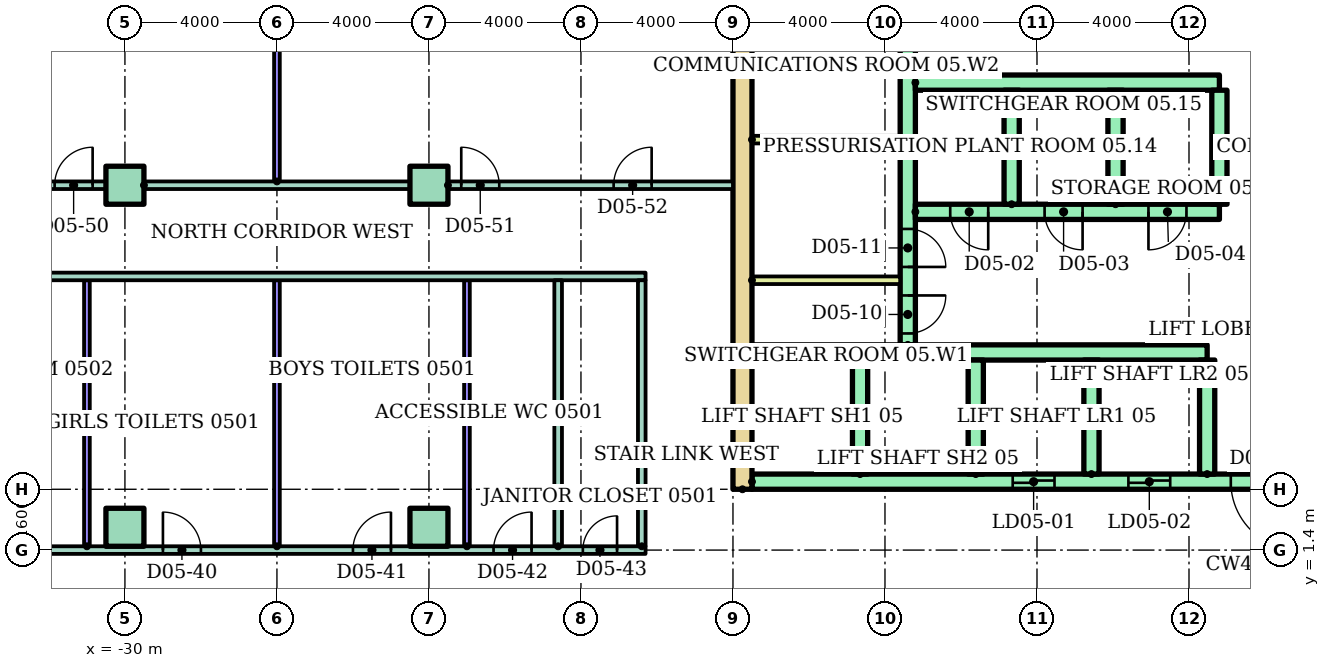
"""IFC4 building model, lengths in metres.
Left out: names, types, materials, properties, quantities, classifications, styles, units other than length and angle.
Written with IfcOpenShell. Run it as: python <this file> out.ifc"""

import sys

from ifc_helpers import new_model, si_unit, direction, frame, frame_2d, origin, origin_2d, place, context, subcontext, project, spatial, rectangle, extrude, element, fill, save


model = new_model("IFC4")
c1 = context("Model", 3, precision=1e-05, world=origin(), true_north=direction((0.0, 1.0)))
c2 = subcontext(c1, "Body", "Model", "MODEL_VIEW")
j1 = project(units=[si_unit("LENGTHUNIT", "METRE"), si_unit("PLANEANGLEUNIT", "RADIAN")], contexts=[c1])
p1 = place(None, origin())
s1 = spatial("IfcSite", under=j1, at=p1, CompositionType="ELEMENT")
p2 = place(p1, origin())
s2 = spatial("IfcBuilding", under=s1, at=p2, CompositionType="ELEMENT")
p3 = place(p2, frame((0.0, 0.0, 22.0)))
s3 = spatial("IfcBuildingStorey", under=s2, at=p3, CompositionType="ELEMENT", Elevation=22.0)
for number, where in (
    (1, (-30.0, 2.0, 0.0)),
    (2, (-22.0, 2.0, 0.0)),
    (3, (-30.0, 11.0, 0.0)),
    (4, (-22.0, 11.0, 0.0)),
):
    element("IfcColumn", number, at=place(p3, frame(where)), inside=s3, PredefinedType="COLUMN", context=c2, shape_type="SweptSolid", body=[
        extrude(rectangle(XDim=1.0, YDim=1.0, at=origin_2d()), origin(), (0.0, 0.0, 1.0), 4.0),
    ])
p4 = place(p3, frame((-13.75, 3.0, 0.0), z_axis=(0.0, 0.0, 1.0), x_axis=(0.0, 1.0, 0.0)))
e5 = element("IfcWall", 5, at=p4, inside=s3, PredefinedType="SHEAR", context=c2, shape_type="SweptSolid", body=[
    extrude(rectangle(XDim=17.0, YDim=0.5, at=frame_2d((8.5, 0.0))), origin(), (0.0, 0.0, 1.0), 3.2),
])
p5 = place(p3, frame((-9.4, 6.8, 0.0), z_axis=(0.0, 0.0, 1.0), x_axis=(0.0, 1.0, 0.0)))
e6 = element("IfcWall", 6, at=p5, inside=s3, PredefinedType="SHEAR", context=c2, shape_type="SweptSolid", body=[
    extrude(rectangle(XDim=12.7, YDim=0.4, at=frame_2d((6.35, 0.0))), origin(), (0.0, 0.0, 1.0), 3.2),
])
p6 = place(p5, frame((0.3, 0.0, 0.0)))
e7 = element("IfcOpeningElement", 7, at=p6, cuts=e6, PredefinedType="OPENING", context=c2, shape_type="SweptSolid", body=[
    extrude(rectangle(XDim=1.0, YDim=2.1, at=frame_2d((0.5, 1.05))), frame((0.0, 0.21, 0.0), z_axis=(0.0, -1.0, 0.0), x_axis=(1.0, 0.0, 0.0)), (0.0, 0.0, 1.0), 0.42),
])
p7 = place(p5, frame((2.05, 0.0, 0.0)))
e8 = element("IfcOpeningElement", 8, at=p7, cuts=e6, PredefinedType="OPENING", context=c2, shape_type="SweptSolid", body=[
    extrude(rectangle(XDim=1.0, YDim=2.1, at=frame_2d((0.5, 1.05))), frame((0.0, 0.21, 0.0), z_axis=(0.0, -1.0, 0.0), x_axis=(1.0, 0.0, 0.0)), (0.0, 0.0, 1.0), 0.42),
])
p8 = place(p5, frame((7.925, 0.0, 0.0)))
e9 = element("IfcOpeningElement", 9, at=p8, cuts=e6, PredefinedType="OPENING", context=c2, shape_type="SweptSolid", body=[
    extrude(rectangle(XDim=1.0, YDim=2.1, at=frame_2d((0.5, 1.05))), frame((0.0, 0.21, 0.0), z_axis=(0.0, -1.0, 0.0), x_axis=(1.0, 0.0, 0.0)), (0.0, 0.0, 1.0), 0.42),
])
p9 = place(p3, frame((-13.5, 3.2, 0.0)))
e10 = element("IfcWall", 10, at=p9, inside=s3, PredefinedType="SHEAR", context=c2, shape_type="SweptSolid", body=[
    extrude(rectangle(XDim=27.0, YDim=0.4, at=frame_2d((13.5, 0.0))), origin(), (0.0, 0.0, 1.0), 3.2),
])
p10 = place(p9, frame((6.861, 0.0, 0.0)))
e11 = element("IfcOpeningElement", 11, at=p10, cuts=e10, PredefinedType="OPENING", context=c2, shape_type="SweptSolid", body=[
    extrude(rectangle(XDim=1.1, YDim=2.1, at=frame_2d((0.55, 1.05))), frame((0.0, 0.21, 0.0), z_axis=(0.0, -1.0, 0.0), x_axis=(1.0, 0.0, 0.0)), (0.0, 0.0, 1.0), 0.42),
])
p11 = place(p9, frame((9.906, 0.0, 0.0)))
e12 = element("IfcOpeningElement", 12, at=p11, cuts=e10, PredefinedType="OPENING", context=c2, shape_type="SweptSolid", body=[
    extrude(rectangle(XDim=1.1, YDim=2.1, at=frame_2d((0.55, 1.05))), frame((0.0, 0.21, 0.0), z_axis=(0.0, -1.0, 0.0), x_axis=(1.0, 0.0, 0.0)), (0.0, 0.0, 1.0), 0.42),
])
p12 = place(p9, frame((15.994, 0.0, 0.0)))
e13 = element("IfcOpeningElement", 13, at=p12, cuts=e10, PredefinedType="OPENING", context=c2, shape_type="SweptSolid", body=[
    extrude(rectangle(XDim=1.1, YDim=2.1, at=frame_2d((0.55, 1.05))), frame((0.0, 0.21, 0.0), z_axis=(0.0, -1.0, 0.0), x_axis=(1.0, 0.0, 0.0)), (0.0, 0.0, 1.0), 0.42),
])
p13 = place(p9, frame((19.039, 0.0, 0.0)))
e14 = element("IfcOpeningElement", 14, at=p13, cuts=e10, PredefinedType="OPENING", context=c2, shape_type="SweptSolid", body=[
    extrude(rectangle(XDim=1.1, YDim=2.1, at=frame_2d((0.55, 1.05))), frame((0.0, 0.21, 0.0), z_axis=(0.0, -1.0, 0.0), x_axis=(1.0, 0.0, 0.0)), (0.0, 0.0, 1.0), 0.42),
])
p14 = place(p9, frame((12.6, 0.0, 0.0)))
e15 = element("IfcOpeningElement", 15, at=p14, cuts=e10, PredefinedType="OPENING", context=c2, shape_type="SweptSolid", body=[
    extrude(rectangle(XDim=1.8, YDim=2.1, at=frame_2d((0.9, 1.05))), frame((0.0, 0.21, 0.0), z_axis=(0.0, -1.0, 0.0), x_axis=(1.0, 0.0, 0.0)), (0.0, 0.0, 1.0), 0.42),
])
p15 = place(p3, frame((-13.5, 6.6, 0.0)))
e16 = element("IfcWall", 16, at=p15, inside=s3, PredefinedType="SHEAR", context=c2, shape_type="SweptSolid", body=[
    extrude(rectangle(XDim=11.978, YDim=0.4, at=frame_2d((5.989, 0.0))), origin(), (0.0, 0.0, 1.0), 3.2),
])
for number, where, z_axis, x_axis in (
    (17, (-10.656, 3.4, 0.0), (0.0, 0.0, 1.0), (0.0, 1.0, 0.0)),
    (18, (-7.611, 3.4, 0.0), (0.0, 0.0, 1.0), (0.0, 1.0, 0.0)),
    (19, (-4.567, 3.4, 0.0), (0.0, 0.0, 1.0), (0.0, 1.0, 0.0)),
    (20, (-1.522, 3.4, 0.0), (0.0, 0.0, 1.0), (0.0, 1.0, 0.0)),
):
    element("IfcWall", number, at=place(p3, frame(where, z_axis=z_axis, x_axis=x_axis)), inside=s3, PredefinedType="SHEAR", context=c2, shape_type="SweptSolid", body=[
        extrude(rectangle(XDim=3.0, YDim=0.4, at=frame_2d((1.5, 0.0))), origin(), (0.0, 0.0, 1.0), 3.2),
    ])
p16 = place(p3, frame((-9.2, 10.3, 0.0)))
e21 = element("IfcWall", 21, at=p16, inside=s3, PredefinedType="SHEAR", context=c2, shape_type="SweptSolid", body=[
    extrude(rectangle(XDim=8.0, YDim=0.4, at=frame_2d((4.0, 0.0))), origin(), (0.0, 0.0, 1.0), 3.2),
])
p17 = place(p16, frame((0.917, 0.0, 0.0)))
e22 = element("IfcOpeningElement", 22, at=p17, cuts=e21, PredefinedType="OPENING", context=c2, shape_type="SweptSolid", body=[
    extrude(rectangle(XDim=1.0, YDim=2.1, at=frame_2d((0.5, 1.05))), frame((0.0, 0.21, 0.0), z_axis=(0.0, -1.0, 0.0), x_axis=(1.0, 0.0, 0.0)), (0.0, 0.0, 1.0), 0.42),
])
p18 = place(p16, frame((3.4, 0.0, 0.0)))
e23 = element("IfcOpeningElement", 23, at=p18, cuts=e21, PredefinedType="OPENING", context=c2, shape_type="SweptSolid", body=[
    extrude(rectangle(XDim=1.0, YDim=2.1, at=frame_2d((0.5, 1.05))), frame((0.0, 0.21, 0.0), z_axis=(0.0, -1.0, 0.0), x_axis=(1.0, 0.0, 0.0)), (0.0, 0.0, 1.0), 0.42),
])
p19 = place(p16, frame((6.133, 0.0, 0.0)))
e24 = element("IfcOpeningElement", 24, at=p19, cuts=e21, PredefinedType="OPENING", context=c2, shape_type="SweptSolid", body=[
    extrude(rectangle(XDim=1.0, YDim=2.1, at=frame_2d((0.5, 1.05))), frame((0.0, 0.21, 0.0), z_axis=(0.0, -1.0, 0.0), x_axis=(1.0, 0.0, 0.0)), (0.0, 0.0, 1.0), 0.42),
])
p20 = place(p3, frame((-9.2, 13.7, 0.0)))
e25 = element("IfcWall", 25, at=p20, inside=s3, PredefinedType="SHEAR", context=c2, shape_type="SweptSolid", body=[
    extrude(rectangle(XDim=8.0, YDim=0.4, at=frame_2d((4.0, 0.0))), origin(), (0.0, 0.0, 1.0), 3.2),
])
for number, where, z_axis, x_axis in (
    (26, (-6.667, 10.5, 0.0), (0.0, 0.0, 1.0), (0.0, 1.0, 0.0)),
    (27, (-3.933, 10.5, 0.0), (0.0, 0.0, 1.0), (0.0, 1.0, 0.0)),
    (28, (-1.2, 10.5, 0.0), (0.0, 0.0, 1.0), (0.0, 1.0, 0.0)),
):
    element("IfcWall", number, at=place(p3, frame(where, z_axis=z_axis, x_axis=x_axis)), inside=s3, PredefinedType="SHEAR", context=c2, shape_type="SweptSolid", body=[
        extrude(rectangle(XDim=3.0, YDim=0.4, at=frame_2d((1.5, 0.0))), origin(), (0.0, 0.0, 1.0), 3.2),
    ])
for number, where in (
    (29, (-13.5, 8.5, 0.0)),
    (30, (-13.5, 12.2, 0.0)),
):
    element("IfcWall", number, at=place(p3, frame(where)), inside=s3, PredefinedType="PARTITIONING", context=c2, shape_type="SweptSolid", body=[
        extrude(rectangle(XDim=3.9, YDim=0.2, at=frame_2d((1.95, 0.0))), origin(), (0.0, 0.0, 1.0), 3.2),
    ])
p21 = place(p3, frame((-36.9, 1.4, 0.0)))
e31 = element("IfcWall", 31, at=p21, inside=s3, PredefinedType="PARTITIONING", context=c2, shape_type="SweptSolid", body=[
    extrude(rectangle(XDim=20.6, YDim=0.2, at=frame_2d((10.3, 0.0))), origin(), (0.0, 0.0, 1.0), 3.2),
])
p22 = place(p21, frame((7.9, 0.0, 0.0)))
e32 = element("IfcOpeningElement", 32, at=p22, cuts=e31, PredefinedType="OPENING", context=c2, shape_type="SweptSolid", body=[
    extrude(rectangle(XDim=1.0, YDim=2.1, at=frame_2d((0.5, 1.05))), frame((0.0, 0.11, 0.0), z_axis=(0.0, -1.0, 0.0), x_axis=(1.0, 0.0, 0.0)), (0.0, 0.0, 1.0), 0.22),
])
p23 = place(p21, frame((12.9, 0.0, 0.0)))
e33 = element("IfcOpeningElement", 33, at=p23, cuts=e31, PredefinedType="OPENING", context=c2, shape_type="SweptSolid", body=[
    extrude(rectangle(XDim=1.0, YDim=2.1, at=frame_2d((0.5, 1.05))), frame((0.0, 0.11, 0.0), z_axis=(0.0, -1.0, 0.0), x_axis=(1.0, 0.0, 0.0)), (0.0, 0.0, 1.0), 0.22),
])
p24 = place(p21, frame((16.6, 0.0, 0.0)))
e34 = element("IfcOpeningElement", 34, at=p24, cuts=e31, PredefinedType="OPENING", context=c2, shape_type="SweptSolid", body=[
    extrude(rectangle(XDim=1.0, YDim=2.1, at=frame_2d((0.5, 1.05))), frame((0.0, 0.11, 0.0), z_axis=(0.0, -1.0, 0.0), x_axis=(1.0, 0.0, 0.0)), (0.0, 0.0, 1.0), 0.22),
])
p25 = place(p21, frame((18.95, 0.0, 0.0)))
e35 = element("IfcOpeningElement", 35, at=p25, cuts=e31, PredefinedType="OPENING", context=c2, shape_type="SweptSolid", body=[
    extrude(rectangle(XDim=0.9, YDim=2.1, at=frame_2d((0.45, 1.05))), frame((0.0, 0.11, 0.0), z_axis=(0.0, -1.0, 0.0), x_axis=(1.0, 0.0, 0.0)), (0.0, 0.0, 1.0), 0.22),
])
p26 = place(p3, frame((-37.6, 8.6, 0.0)))
e36 = element("IfcWall", 36, at=p26, inside=s3, PredefinedType="PARTITIONING", context=c2, shape_type="SweptSolid", body=[
    extrude(rectangle(XDim=21.3, YDim=0.2, at=frame_2d((10.65, 0.0))), origin(), (0.0, 0.0, 1.0), 3.2),
])
p27 = place(p3, frame((-36.9, 11.0, 0.0)))
e37 = element("IfcWall", 37, at=p27, inside=s3, PredefinedType="PARTITIONING", context=c2, shape_type="SweptSolid", body=[
    extrude(rectangle(XDim=6.4, YDim=0.2, at=frame_2d((3.2, 0.0))), origin(), (0.0, 0.0, 1.0), 3.2),
])
p28 = place(p27, frame((1.352, 0.0, 0.0)))
e38 = element("IfcOpeningElement", 38, at=p28, cuts=e37, PredefinedType="OPENING", context=c2, shape_type="SweptSolid", body=[
    extrude(rectangle(XDim=1.0, YDim=2.1, at=frame_2d((0.5, 1.05))), frame((0.0, 0.11, 0.0), z_axis=(0.0, -1.0, 0.0), x_axis=(1.0, 0.0, 0.0)), (0.0, 0.0, 1.0), 0.22),
])
p29 = place(p27, frame((5.05, 0.0, 0.0)))
e39 = element("IfcOpeningElement", 39, at=p29, cuts=e37, PredefinedType="OPENING", context=c2, shape_type="SweptSolid", body=[
    extrude(rectangle(XDim=1.0, YDim=2.1, at=frame_2d((0.5, 1.05))), frame((0.0, 0.11, 0.0), z_axis=(0.0, -1.0, 0.0), x_axis=(1.0, 0.0, 0.0)), (0.0, 0.0, 1.0), 0.22),
])
p30 = place(p3, frame((-29.5, 11.0, 0.0)))
e40 = element("IfcWall", 40, at=p30, inside=s3, PredefinedType="PARTITIONING", context=c2, shape_type="SweptSolid", body=[
    extrude(rectangle(XDim=7.0, YDim=0.2, at=frame_2d((3.5, 0.0))), origin(), (0.0, 0.0, 1.0), 3.2),
])
p31 = place(p3, frame((-21.5, 11.0, 0.0)))
e41 = element("IfcWall", 41, at=p31, inside=s3, PredefinedType="PARTITIONING", context=c2, shape_type="SweptSolid", body=[
    extrude(rectangle(XDim=7.5, YDim=0.2, at=frame_2d((3.75, 0.0))), origin(), (0.0, 0.0, 1.0), 3.2),
])
p32 = place(p31, frame((0.35, 0.0, 0.0)))
e42 = element("IfcOpeningElement", 42, at=p32, cuts=e41, PredefinedType="OPENING", context=c2, shape_type="SweptSolid", body=[
    extrude(rectangle(XDim=1.0, YDim=2.1, at=frame_2d((0.5, 1.05))), frame((0.0, 0.11, 0.0), z_axis=(0.0, -1.0, 0.0), x_axis=(1.0, 0.0, 0.0)), (0.0, 0.0, 1.0), 0.22),
])
p33 = place(p31, frame((4.36, 0.0, 0.0)))
e43 = element("IfcOpeningElement", 43, at=p33, cuts=e41, PredefinedType="OPENING", context=c2, shape_type="SweptSolid", body=[
    extrude(rectangle(XDim=1.0, YDim=2.1, at=frame_2d((0.5, 1.05))), frame((0.0, 0.11, 0.0), z_axis=(0.0, -1.0, 0.0), x_axis=(1.0, 0.0, 0.0)), (0.0, 0.0, 1.0), 0.22),
])
for number, where, z_axis, x_axis in (
    (44, (-31.0, 1.5, 0.0), (0.0, 0.0, 1.0), (0.0, 1.0, 0.0)),
    (45, (-26.0, 1.5, 0.0), (0.0, 0.0, 1.0), (0.0, 1.0, 0.0)),
):
    element("IfcWall", number, at=place(p3, frame(where, z_axis=z_axis, x_axis=x_axis)), inside=s3, PredefinedType="PARTITIONING", context=c2, shape_type="SweptSolid", body=[
        extrude(rectangle(XDim=7.0, YDim=0.15, at=frame_2d((3.5, 0.0))), origin(), (0.0, 0.0, 1.0), 3.2),
    ])
p34 = place(p3, frame((-26.0, 11.1, 0.0), z_axis=(0.0, 0.0, 1.0), x_axis=(0.0, 1.0, 0.0)))
e46 = element("IfcWall", 46, at=p34, inside=s3, PredefinedType="PARTITIONING", context=c2, shape_type="SweptSolid", body=[
    extrude(rectangle(XDim=8.5, YDim=0.15, at=frame_2d((4.25, 0.0))), origin(), (0.0, 0.0, 1.0), 3.2),
])
p35 = place(p3, frame((-21.0, 1.5, 0.0), z_axis=(0.0, 0.0, 1.0), x_axis=(0.0, 1.0, 0.0)))
e47 = element("IfcWall", 47, at=p35, inside=s3, PredefinedType="PARTITIONING", context=c2, shape_type="SweptSolid", body=[
    extrude(rectangle(XDim=7.0, YDim=0.15, at=frame_2d((3.5, 0.0))), origin(), (0.0, 0.0, 1.0), 3.2),
])
for number, where, z_axis, x_axis in (
    (48, (-18.6, 1.5, 0.0), (0.0, 0.0, 1.0), (0.0, 1.0, 0.0)),
    (49, (-16.4, 1.5, 0.0), (0.0, 0.0, 1.0), (0.0, 1.0, 0.0)),
):
    element("IfcWall", number, at=place(p3, frame(where, z_axis=z_axis, x_axis=x_axis)), inside=s3, PredefinedType="PARTITIONING", context=c2, shape_type="SweptSolid", body=[
        extrude(rectangle(XDim=7.0, YDim=0.2, at=frame_2d((3.5, 0.0))), origin(), (0.0, 0.0, 1.0), 3.2),
    ])
p36 = place(p10, origin())
e50 = element("IfcDoor", 50, at=p36, inside=s3, OperationType="SLIDING_TO_LEFT", PredefinedType="DOOR", context=c2, shape_type="SweptSolid", body=[
    extrude(rectangle(XDim=1.1, YDim=2.1, at=frame_2d((0.55, 1.05))), frame((0.0, 0.025, 0.0), z_axis=(0.0, -1.0, 0.0), x_axis=(1.0, 0.0, 0.0)), (0.0, 0.0, 1.0), 0.05),
])
fill(e11, e50)
p37 = place(p11, origin())
e51 = element("IfcDoor", 51, at=p37, inside=s3, OperationType="SLIDING_TO_LEFT", PredefinedType="DOOR", context=c2, shape_type="SweptSolid", body=[
    extrude(rectangle(XDim=1.1, YDim=2.1, at=frame_2d((0.55, 1.05))), frame((0.0, 0.025, 0.0), z_axis=(0.0, -1.0, 0.0), x_axis=(1.0, 0.0, 0.0)), (0.0, 0.0, 1.0), 0.05),
])
fill(e12, e51)
p38 = place(p14, frame((1.8, 0.0, 0.0), z_axis=(0.0, 0.0, 1.0), x_axis=(-1.0, 0.0, 0.0)))
e52 = element("IfcDoor", 52, at=p38, inside=s3, OperationType="DOUBLE_DOOR_SINGLE_SWING", PredefinedType="DOOR", context=c2, shape_type="SweptSolid", body=[
    extrude(rectangle(XDim=1.8, YDim=2.1, at=frame_2d((0.9, 1.05))), frame((0.0, 0.025, 0.0), z_axis=(0.0, -1.0, 0.0), x_axis=(1.0, 0.0, 0.0)), (0.0, 0.0, 1.0), 0.05),
])
fill(e15, e52)
p39 = place(p17, frame((1.0, 0.0, 0.0), z_axis=(0.0, 0.0, 1.0), x_axis=(-1.0, 0.0, 0.0)))
e53 = element("IfcDoor", 53, at=p39, inside=s3, OperationType="SINGLE_SWING_RIGHT", PredefinedType="DOOR", context=c2, shape_type="SweptSolid", body=[
    extrude(rectangle(XDim=1.0, YDim=2.1, at=frame_2d((0.5, 1.05))), frame((0.0, 0.025, 0.0), z_axis=(0.0, -1.0, 0.0), x_axis=(1.0, 0.0, 0.0)), (0.0, 0.0, 1.0), 0.05),
])
fill(e22, e53)
p40 = place(p18, frame((1.0, 0.0, 0.0), z_axis=(0.0, 0.0, 1.0), x_axis=(-1.0, 0.0, 0.0)))
e54 = element("IfcDoor", 54, at=p40, inside=s3, OperationType="SINGLE_SWING_RIGHT", PredefinedType="DOOR", context=c2, shape_type="SweptSolid", body=[
    extrude(rectangle(XDim=1.0, YDim=2.1, at=frame_2d((0.5, 1.05))), frame((0.0, 0.025, 0.0), z_axis=(0.0, -1.0, 0.0), x_axis=(1.0, 0.0, 0.0)), (0.0, 0.0, 1.0), 0.05),
])
fill(e23, e54)
p41 = place(p19, frame((1.0, 0.0, 0.0), z_axis=(0.0, 0.0, 1.0), x_axis=(-1.0, 0.0, 0.0)))
e55 = element("IfcDoor", 55, at=p41, inside=s3, OperationType="SINGLE_SWING_LEFT", PredefinedType="DOOR", context=c2, shape_type="SweptSolid", body=[
    extrude(rectangle(XDim=1.0, YDim=2.1, at=frame_2d((0.5, 1.05))), frame((0.0, 0.025, 0.0), z_axis=(0.0, -1.0, 0.0), x_axis=(1.0, 0.0, 0.0)), (0.0, 0.0, 1.0), 0.05),
])
fill(e24, e55)
p42 = place(p6, frame((1.0, 0.0, 0.0), z_axis=(0.0, 0.0, 1.0), x_axis=(-1.0, 0.0, 0.0)))
e56 = element("IfcDoor", 56, at=p42, inside=s3, OperationType="SINGLE_SWING_RIGHT", PredefinedType="DOOR", context=c2, shape_type="SweptSolid", body=[
    extrude(rectangle(XDim=1.0, YDim=2.1, at=frame_2d((0.5, 1.05))), frame((0.0, 0.025, 0.0), z_axis=(0.0, -1.0, 0.0), x_axis=(1.0, 0.0, 0.0)), (0.0, 0.0, 1.0), 0.05),
])
fill(e7, e56)
p43 = place(p7, frame((1.0, 0.0, 0.0), z_axis=(0.0, 0.0, 1.0), x_axis=(-1.0, 0.0, 0.0)))
e57 = element("IfcDoor", 57, at=p43, inside=s3, OperationType="SINGLE_SWING_LEFT", PredefinedType="DOOR", context=c2, shape_type="SweptSolid", body=[
    extrude(rectangle(XDim=1.0, YDim=2.1, at=frame_2d((0.5, 1.05))), frame((0.0, 0.025, 0.0), z_axis=(0.0, -1.0, 0.0), x_axis=(1.0, 0.0, 0.0)), (0.0, 0.0, 1.0), 0.05),
])
fill(e8, e57)
p44 = place(p22, origin())
e58 = element("IfcDoor", 58, at=p44, inside=s3, OperationType="SINGLE_SWING_LEFT", PredefinedType="DOOR", context=c2, shape_type="SweptSolid", body=[
    extrude(rectangle(XDim=1.0, YDim=2.1, at=frame_2d((0.5, 1.05))), frame((0.0, 0.025, 0.0), z_axis=(0.0, -1.0, 0.0), x_axis=(1.0, 0.0, 0.0)), (0.0, 0.0, 1.0), 0.05),
])
fill(e32, e58)
p45 = place(p23, origin())
e59 = element("IfcDoor", 59, at=p45, inside=s3, OperationType="SINGLE_SWING_RIGHT", PredefinedType="DOOR", context=c2, shape_type="SweptSolid", body=[
    extrude(rectangle(XDim=1.0, YDim=2.1, at=frame_2d((0.5, 1.05))), frame((0.0, 0.025, 0.0), z_axis=(0.0, -1.0, 0.0), x_axis=(1.0, 0.0, 0.0)), (0.0, 0.0, 1.0), 0.05),
])
fill(e33, e59)
p46 = place(p24, origin())
e60 = element("IfcDoor", 60, at=p46, inside=s3, OperationType="SINGLE_SWING_RIGHT", PredefinedType="DOOR", context=c2, shape_type="SweptSolid", body=[
    extrude(rectangle(XDim=1.0, YDim=2.1, at=frame_2d((0.5, 1.05))), frame((0.0, 0.025, 0.0), z_axis=(0.0, -1.0, 0.0), x_axis=(1.0, 0.0, 0.0)), (0.0, 0.0, 1.0), 0.05),
])
fill(e34, e60)
p47 = place(p25, origin())
e61 = element("IfcDoor", 61, at=p47, inside=s3, OperationType="SINGLE_SWING_RIGHT", PredefinedType="DOOR", context=c2, shape_type="SweptSolid", body=[
    extrude(rectangle(XDim=0.9, YDim=2.1, at=frame_2d((0.45, 1.05))), frame((0.0, 0.025, 0.0), z_axis=(0.0, -1.0, 0.0), x_axis=(1.0, 0.0, 0.0)), (0.0, 0.0, 1.0), 0.05),
])
fill(e35, e61)
p48 = place(p29, origin())
e62 = element("IfcDoor", 62, at=p48, inside=s3, OperationType="SINGLE_SWING_RIGHT", PredefinedType="DOOR", context=c2, shape_type="SweptSolid", body=[
    extrude(rectangle(XDim=1.0, YDim=2.1, at=frame_2d((0.5, 1.05))), frame((0.0, 0.025, 0.0), z_axis=(0.0, -1.0, 0.0), x_axis=(1.0, 0.0, 0.0)), (0.0, 0.0, 1.0), 0.05),
])
fill(e39, e62)
p49 = place(p32, origin())
e63 = element("IfcDoor", 63, at=p49, inside=s3, OperationType="SINGLE_SWING_LEFT", PredefinedType="DOOR", context=c2, shape_type="SweptSolid", body=[
    extrude(rectangle(XDim=1.0, YDim=2.1, at=frame_2d((0.5, 1.05))), frame((0.0, 0.025, 0.0), z_axis=(0.0, -1.0, 0.0), x_axis=(1.0, 0.0, 0.0)), (0.0, 0.0, 1.0), 0.05),
])
fill(e42, e63)
p50 = place(p33, origin())
e64 = element("IfcDoor", 64, at=p50, inside=s3, OperationType="SINGLE_SWING_RIGHT", PredefinedType="DOOR", context=c2, shape_type="SweptSolid", body=[
    extrude(rectangle(XDim=1.0, YDim=2.1, at=frame_2d((0.5, 1.05))), frame((0.0, 0.025, 0.0), z_axis=(0.0, -1.0, 0.0), x_axis=(1.0, 0.0, 0.0)), (0.0, 0.0, 1.0), 0.05),
])
fill(e43, e64)
save(model, sys.argv[1])
